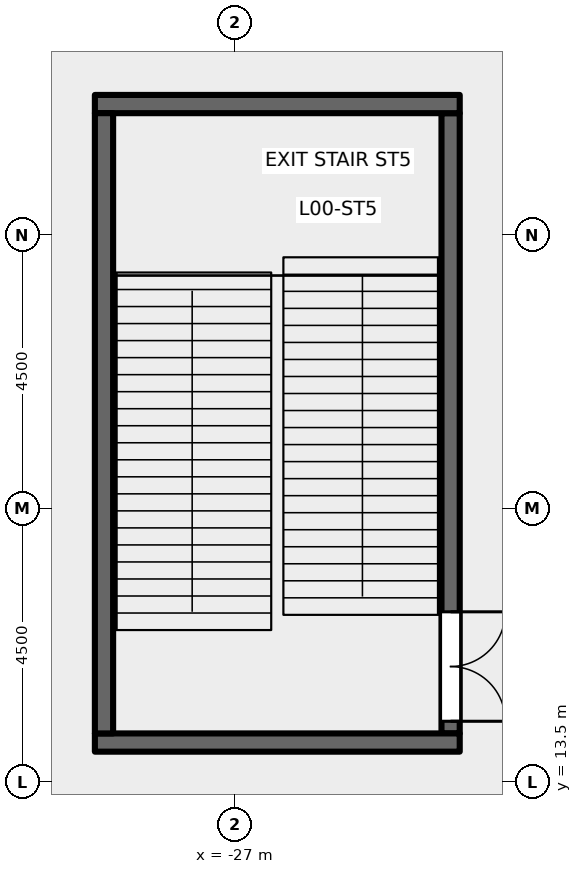
"""IFC4 building model, lengths in metres.
Left out: names, types, materials, properties, quantities, classifications, styles, units other than length and angle.
Written with IfcOpenShell. Run it as: python <this file> out.ifc"""

import sys

from ifc_helpers import new_model, si_unit, direction, frame, frame_2d, origin, place, context, subcontext, project, spatial, rectangle, extrude, element, fill, save


model = new_model("IFC4")
c1 = context("Model", 3, precision=1e-05, world=origin(), true_north=direction((0.0, 1.0)))
c2 = subcontext(c1, "Body", "Model", "MODEL_VIEW")
j1 = project(units=[si_unit("LENGTHUNIT", "METRE"), si_unit("PLANEANGLEUNIT", "RADIAN")], contexts=[c1])
p1 = place(None, origin())
s1 = spatial("IfcSite", under=j1, at=p1, CompositionType="ELEMENT")
p2 = place(p1, origin())
s2 = spatial("IfcBuilding", under=s1, at=p2, CompositionType="ELEMENT")
p3 = place(p2, origin())
s3 = spatial("IfcBuildingStorey", under=s2, at=p3, CompositionType="ELEMENT", Elevation=0.0)
p4 = place(p3, frame((-23.45, 14.3, 0.0), z_axis=(0.0, 0.0, 1.0), x_axis=(0.0, 1.0, 0.0)))
e1 = element("IfcWall", 1, at=p4, inside=s3, PredefinedType="SHEAR", context=c2, shape_type="SweptSolid", body=[
    extrude(rectangle(XDim=10.2, YDim=0.3, at=frame_2d((5.1, 0.0))), origin(), (0.0, 0.0, 1.0), 7.0),
])
p5 = place(p4, frame((0.2, 0.0, 0.0)))
e2 = element("IfcOpeningElement", 2, at=p5, cuts=e1, PredefinedType="OPENING", context=c2, shape_type="SweptSolid", body=[
    extrude(rectangle(XDim=1.8, YDim=2.1, at=frame_2d((0.9, 1.05))), frame((0.0, 0.16, 0.0), z_axis=(0.0, -1.0, 0.0), x_axis=(1.0, 0.0, 0.0)), (0.0, 0.0, 1.0), 0.32),
])
for number, where, z_axis, x_axis in (
    (3, (-29.3, 24.65, 0.0), (0.0, 0.0, 1.0), (1.0, 0.0, 0.0)),
    (4, (-29.3, 14.15, 0.0), (0.0, 0.0, 1.0), (1.0, 0.0, 0.0)),
):
    element("IfcWall", number, at=place(p3, frame(where, z_axis=z_axis, x_axis=x_axis)), inside=s3, PredefinedType="SHEAR", context=c2, shape_type="SweptSolid", body=[
        extrude(rectangle(XDim=6.0, YDim=0.3, at=frame_2d((3.0, 0.0))), origin(), (0.0, 0.0, 1.0), 7.0),
    ])
p6 = place(p3, frame((-29.15, 14.3, 0.0), z_axis=(0.0, 0.0, 1.0), x_axis=(0.0, 1.0, 0.0)))
e5 = element("IfcWall", 5, at=p6, inside=s3, PredefinedType="SHEAR", context=c2, shape_type="SweptSolid", body=[
    extrude(rectangle(XDim=10.2, YDim=0.3, at=frame_2d((5.1, 0.0))), origin(), (0.0, 0.0, 1.0), 7.0),
])
p7 = place(p5, frame((1.8, 0.0, 0.0), z_axis=(0.0, 0.0, 1.0), x_axis=(-1.0, 0.0, 0.0)))
e6 = element("IfcDoor", 6, at=p7, inside=s3, OperationType="DOUBLE_DOOR_SINGLE_SWING", PredefinedType="DOOR", context=c2, shape_type="SweptSolid", body=[
    extrude(rectangle(XDim=1.8, YDim=2.1, at=frame_2d((0.9, 1.05))), frame((0.0, 0.025, 0.0), z_axis=(0.0, -1.0, 0.0), x_axis=(1.0, 0.0, 0.0)), (0.0, 0.0, 1.0), 0.05),
])
fill(e2, e6)
save(model, sys.argv[1])
